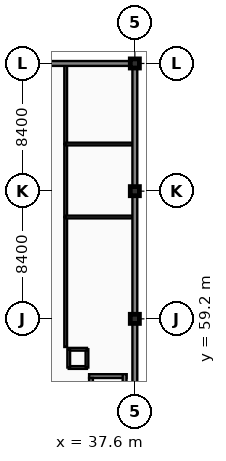
"""IFC4 building model, lengths in metres.
Left out: names, types, materials, properties, quantities, classifications, styles, units other than length and angle.
Written with IfcOpenShell. Run it as: python <this file> out.ifc"""

import sys

from ifc_helpers import new_model, si_unit, direction, frame, frame_2d, origin, origin_2d, place, context, subcontext, project, spatial, rectangle, extrude, element, fill, save


model = new_model("IFC4")
c1 = context("Model", 3, precision=1e-05, world=origin(), true_north=direction((0.0, 1.0)))
c2 = subcontext(c1, "Body", "Model", "MODEL_VIEW")
j1 = project(units=[si_unit("LENGTHUNIT", "METRE"), si_unit("PLANEANGLEUNIT", "RADIAN")], contexts=[c1])
p1 = place(None, origin())
s1 = spatial("IfcSite", under=j1, at=p1, CompositionType="ELEMENT")
p2 = place(p1, origin())
s2 = spatial("IfcBuilding", under=s1, at=p2, CompositionType="ELEMENT")
p3 = place(p2, origin())
s3 = spatial("IfcBuildingStorey", under=s2, at=p3, CompositionType="ELEMENT", Elevation=0.0)
for number, where, z_axis, x_axis in (
    (1, (37.6, 59.2, 0.0), (0.0, 0.0, 1.0), (1.0, 0.0, 0.0)),
    (2, (37.6, 67.6, 0.0), (0.0, 0.0, 1.0), (1.0, 0.0, 0.0)),
    (3, (37.6, 76.0, 0.0), (0.0, 0.0, 1.0), (1.0, 0.0, 0.0)),
):
    element("IfcColumn", number, at=place(p3, frame(where, z_axis=z_axis, x_axis=x_axis)), inside=s3, PredefinedType="COLUMN", context=c2, shape_type="SweptSolid", body=[
        extrude(rectangle(XDim=0.6, YDim=0.6, at=origin_2d()), origin(), (0.0, 0.0, 1.0), 5.4),
    ])
p4 = place(p3, frame((33.05, 57.35, 0.0), z_axis=(0.0, 0.0, 1.0), x_axis=(0.0, 1.0, 0.0)))
e4 = element("IfcWall", 4, at=p4, inside=s3, PredefinedType="PARTITIONING", context=c2, shape_type="SweptSolid", body=[
    extrude(rectangle(XDim=8.55, YDim=0.18, at=frame_2d((4.275, 0.0))), origin(), (0.0, 0.0, 1.0), 4.54),
])
p5 = place(p4, frame((3.775, 0.0, -0.01)))
e5 = element("IfcOpeningElement", 5, at=p5, cuts=e4, PredefinedType="OPENING", context=c2, shape_type="SweptSolid", body=[
    extrude(rectangle(XDim=1.0, YDim=2.16, at=frame_2d((0.5, 1.08))), frame((0.0, 0.1, 0.0), z_axis=(0.0, -1.0, 0.0), x_axis=(1.0, 0.0, 0.0)), (0.0, 0.0, 1.0), 0.2),
])
p6 = place(p3, frame((33.05, 65.9, 0.0), z_axis=(0.0, 0.0, 1.0), x_axis=(0.0, 1.0, 0.0)))
e6 = element("IfcWall", 6, at=p6, inside=s3, PredefinedType="PARTITIONING", context=c2, shape_type="SweptSolid", body=[
    extrude(rectangle(XDim=4.8, YDim=0.18, at=frame_2d((2.4, 0.0))), origin(), (0.0, 0.0, 1.0), 4.54),
])
p7 = place(p6, frame((1.9, 0.0, -0.01)))
e7 = element("IfcOpeningElement", 7, at=p7, cuts=e6, PredefinedType="OPENING", context=c2, shape_type="SweptSolid", body=[
    extrude(rectangle(XDim=1.0, YDim=2.16, at=frame_2d((0.5, 1.08))), frame((0.0, 0.1, 0.0), z_axis=(0.0, -1.0, 0.0), x_axis=(1.0, 0.0, 0.0)), (0.0, 0.0, 1.0), 0.2),
])
p8 = place(p3, frame((33.05, 70.7, 0.0), z_axis=(0.0, 0.0, 1.0), x_axis=(0.0, 1.0, 0.0)))
e8 = element("IfcWall", 8, at=p8, inside=s3, PredefinedType="PARTITIONING", context=c2, shape_type="SweptSolid", body=[
    extrude(rectangle(XDim=5.15, YDim=0.18, at=frame_2d((2.575, 0.0))), origin(), (0.0, 0.0, 1.0), 4.64),
])
p9 = place(p8, frame((2.075, 0.0, -0.01)))
e9 = element("IfcOpeningElement", 9, at=p9, cuts=e8, PredefinedType="OPENING", context=c2, shape_type="SweptSolid", body=[
    extrude(rectangle(XDim=1.0, YDim=2.16, at=frame_2d((0.5, 1.08))), frame((0.0, 0.1, 0.0), z_axis=(0.0, -1.0, 0.0), x_axis=(1.0, 0.0, 0.0)), (0.0, 0.0, 1.0), 0.2),
])
for number, where, z_axis, x_axis in (
    (10, (33.05, 65.9, 0.0), (0.0, 0.0, 1.0), (1.0, 0.0, 0.0)),
    (11, (33.05, 70.7, 0.0), (0.0, 0.0, 1.0), (1.0, 0.0, 0.0)),
):
    element("IfcWall", number, at=place(p3, frame(where, z_axis=z_axis, x_axis=x_axis)), inside=s3, PredefinedType="PARTITIONING", context=c2, shape_type="SweptSolid", body=[
        extrude(rectangle(XDim=4.4, YDim=0.18, at=frame_2d((2.2, 0.0))), origin(), (0.0, 0.0, 1.0), 4.64),
    ])
p10 = place(p3, frame((37.6, 76.0, 0.0), z_axis=(0.0, 0.0, 1.0), x_axis=(-1.0, 0.0, 0.0)))
e12 = element("IfcWall", 12, at=p10, inside=s3, PredefinedType="SOLIDWALL", context=c2, shape_type="SweptSolid", body=[
    extrude(rectangle(XDim=8.4, YDim=0.32, at=frame_2d((4.2, 0.0))), origin(), (0.0, 0.0, 1.0), 4.64),
])
p11 = place(p10, frame((0.46, 0.0, 0.9)))
e13 = element("IfcOpeningElement", 13, at=p11, cuts=e12, PredefinedType="OPENING", context=c2, shape_type="SweptSolid", body=[
    extrude(rectangle(XDim=2.4, YDim=2.35, at=frame_2d((1.2, 1.175))), frame((0.0, 0.17, 0.0), z_axis=(0.0, -1.0, 0.0), x_axis=(1.0, 0.0, 0.0)), (0.0, 0.0, 1.0), 0.34),
])
p12 = place(p10, frame((5.46, 0.0, 0.9)))
e14 = element("IfcOpeningElement", 14, at=p12, cuts=e12, PredefinedType="OPENING", context=c2, shape_type="SweptSolid", body=[
    extrude(rectangle(XDim=2.4, YDim=2.35, at=frame_2d((1.2, 1.175))), frame((0.0, 0.17, 0.0), z_axis=(0.0, -1.0, 0.0), x_axis=(1.0, 0.0, 0.0)), (0.0, 0.0, 1.0), 0.34),
])
p13 = place(p3, frame((37.6, 50.8, 0.0), z_axis=(0.0, 0.0, 1.0), x_axis=(0.0, 1.0, 0.0)))
e15 = element("IfcWall", 15, at=p13, inside=s3, PredefinedType="SOLIDWALL", context=c2, shape_type="SweptSolid", body=[
    extrude(rectangle(XDim=8.4, YDim=0.32, at=frame_2d((4.2, 0.0))), origin(), (0.0, 0.0, 1.0), 4.54),
])
p14 = place(p13, frame((3.2, 0.0, -0.01)))
e16 = element("IfcOpeningElement", 16, at=p14, cuts=e15, PredefinedType="OPENING", context=c2, shape_type="SweptSolid", body=[
    extrude(rectangle(XDim=2.0, YDim=2.41, at=frame_2d((1.0, 1.205))), frame((0.0, 0.17, 0.0), z_axis=(0.0, -1.0, 0.0), x_axis=(1.0, 0.0, 0.0)), (0.0, 0.0, 1.0), 0.34),
])
p15 = place(p3, frame((37.6, 59.2, 0.0), z_axis=(0.0, 0.0, 1.0), x_axis=(0.0, 1.0, 0.0)))
e17 = element("IfcWall", 17, at=p15, inside=s3, PredefinedType="SOLIDWALL", context=c2, shape_type="SweptSolid", body=[
    extrude(rectangle(XDim=8.4, YDim=0.32, at=frame_2d((4.2, 0.0))), origin(), (0.0, 0.0, 1.0), 4.54),
])
p16 = place(p15, frame((0.46, 0.0, 0.9)))
e18 = element("IfcOpeningElement", 18, at=p16, cuts=e17, PredefinedType="OPENING", context=c2, shape_type="SweptSolid", body=[
    extrude(rectangle(XDim=2.4, YDim=2.35, at=frame_2d((1.2, 1.175))), frame((0.0, 0.17, 0.0), z_axis=(0.0, -1.0, 0.0), x_axis=(1.0, 0.0, 0.0)), (0.0, 0.0, 1.0), 0.34),
])
p17 = place(p15, frame((4.06, 0.0, 0.9)))
e19 = element("IfcOpeningElement", 19, at=p17, cuts=e17, PredefinedType="OPENING", context=c2, shape_type="SweptSolid", body=[
    extrude(rectangle(XDim=2.4, YDim=2.35, at=frame_2d((1.2, 1.175))), frame((0.0, 0.17, 0.0), z_axis=(0.0, -1.0, 0.0), x_axis=(1.0, 0.0, 0.0)), (0.0, 0.0, 1.0), 0.34),
])
p18 = place(p3, frame((37.6, 67.6, 0.0), z_axis=(0.0, 0.0, 1.0), x_axis=(0.0, 1.0, 0.0)))
e20 = element("IfcWall", 20, at=p18, inside=s3, PredefinedType="SOLIDWALL", context=c2, shape_type="SweptSolid", body=[
    extrude(rectangle(XDim=8.4, YDim=0.32, at=frame_2d((4.2, 0.0))), origin(), (0.0, 0.0, 1.0), 4.54),
])
p19 = place(p18, frame((0.46, 0.0, 0.9)))
e21 = element("IfcOpeningElement", 21, at=p19, cuts=e20, PredefinedType="OPENING", context=c2, shape_type="SweptSolid", body=[
    extrude(rectangle(XDim=2.4, YDim=2.35, at=frame_2d((1.2, 1.175))), frame((0.0, 0.17, 0.0), z_axis=(0.0, -1.0, 0.0), x_axis=(1.0, 0.0, 0.0)), (0.0, 0.0, 1.0), 0.34),
])
p20 = place(p18, frame((5.46, 0.0, 0.9)))
e22 = element("IfcOpeningElement", 22, at=p20, cuts=e20, PredefinedType="OPENING", context=c2, shape_type="SweptSolid", body=[
    extrude(rectangle(XDim=2.4, YDim=2.35, at=frame_2d((1.2, 1.175))), frame((0.0, 0.17, 0.0), z_axis=(0.0, -1.0, 0.0), x_axis=(1.0, 0.0, 0.0)), (0.0, 0.0, 1.0), 0.34),
])
p21 = place(p3, frame((34.59, 55.435, 0.0), z_axis=(0.0, 0.0, 1.0), x_axis=(1.0, 0.0, 0.0)))
e23 = element("IfcWall", 23, at=p21, inside=s3, PredefinedType="SHEAR", context=c2, shape_type="SweptSolid", body=[
    extrude(rectangle(XDim=2.46, YDim=0.25, at=frame_2d((1.23, 0.0))), origin(), (0.0, 0.0, 1.0), 5.4),
])
p22 = place(p3, frame((34.715, 52.85, 0.0), z_axis=(0.0, 0.0, 1.0), x_axis=(0.0, 1.0, 0.0)))
e24 = element("IfcWall", 24, at=p22, inside=s3, PredefinedType="SHEAR", context=c2, shape_type="SweptSolid", body=[
    extrude(rectangle(XDim=2.46, YDim=0.25, at=frame_2d((1.23, 0.0))), origin(), (0.0, 0.0, 1.0), 5.4),
])
p23 = place(p22, frame((0.68, 0.0, -0.01)))
e25 = element("IfcOpeningElement", 25, at=p23, cuts=e24, PredefinedType="OPENING", context=c2, shape_type="SweptSolid", body=[
    extrude(rectangle(XDim=1.1, YDim=2.16, at=frame_2d((0.55, 1.08))), frame((0.0, 0.135, 0.0), z_axis=(0.0, -1.0, 0.0), x_axis=(1.0, 0.0, 0.0)), (0.0, 0.0, 1.0), 0.27),
])
p24 = place(p3, frame((36.925, 52.85, 0.0), z_axis=(0.0, 0.0, 1.0), x_axis=(0.0, 1.0, 0.0)))
e26 = element("IfcWall", 26, at=p24, inside=s3, PredefinedType="SHEAR", context=c2, shape_type="SweptSolid", body=[
    extrude(rectangle(XDim=2.71, YDim=0.25, at=frame_2d((1.355, 0.0))), origin(), (0.0, 0.0, 1.0), 5.4),
])
for number, where, z_axis, x_axis in (
    (27, (33.25, 56.0, 0.0), (0.0, 0.0, 1.0), (1.0, 0.0, 0.0)),
    (28, (34.45, 56.0, 0.0), (0.0, 0.0, 1.0), (0.0, 1.0, 0.0)),
    (29, (34.45, 57.2, 0.0), (0.0, 0.0, 1.0), (-1.0, 0.0, 0.0)),
):
    element("IfcWall", number, at=place(p3, frame(where, z_axis=z_axis, x_axis=x_axis)), inside=s3, PredefinedType="SOLIDWALL", context=c2, shape_type="SweptSolid", body=[
        extrude(rectangle(XDim=1.2, YDim=0.18, at=frame_2d((0.6, 0.0))), origin(), (0.0, 0.0, 1.0), 5.07),
    ])
p25 = place(p3, frame((33.25, 57.2, 0.0), z_axis=(0.0, 0.0, 1.0), x_axis=(0.0, -1.0, 0.0)))
e30 = element("IfcWall", 30, at=p25, inside=s3, PredefinedType="SOLIDWALL", context=c2, shape_type="SweptSolid", body=[
    extrude(rectangle(XDim=1.2, YDim=0.18, at=frame_2d((0.6, 0.0))), origin(), (0.0, 0.0, 1.0), 5.07),
])
p26 = place(p25, frame((0.2, 0.0, -0.01)))
e31 = element("IfcOpeningElement", 31, at=p26, cuts=e30, PredefinedType="OPENING", context=c2, shape_type="SweptSolid", body=[
    extrude(rectangle(XDim=0.8, YDim=2.06, at=frame_2d((0.4, 1.03))), frame((0.0, 0.1, 0.0), z_axis=(0.0, -1.0, 0.0), x_axis=(1.0, 0.0, 0.0)), (0.0, 0.0, 1.0), 0.2),
])
p27 = place(p5, frame((1.0, 0.0, 0.01), z_axis=(0.0, 0.0, 1.0), x_axis=(-1.0, 0.0, 0.0)))
e32 = element("IfcDoor", 32, at=p27, inside=s3, OperationType="SINGLE_SWING_LEFT", PredefinedType="DOOR", context=c2, shape_type="SweptSolid", body=[
    extrude(rectangle(XDim=1.0, YDim=2.15, at=frame_2d((0.5, 1.075))), frame((0.0, 0.025, 0.0), z_axis=(0.0, -1.0, 0.0), x_axis=(1.0, 0.0, 0.0)), (0.0, 0.0, 1.0), 0.05),
])
fill(e5, e32)
p28 = place(p7, frame((0.0, 0.0, 0.01)))
e33 = element("IfcDoor", 33, at=p28, inside=s3, OperationType="SINGLE_SWING_RIGHT", PredefinedType="DOOR", context=c2, shape_type="SweptSolid", body=[
    extrude(rectangle(XDim=1.0, YDim=2.15, at=frame_2d((0.5, 1.075))), frame((0.0, 0.025, 0.0), z_axis=(0.0, -1.0, 0.0), x_axis=(1.0, 0.0, 0.0)), (0.0, 0.0, 1.0), 0.05),
])
fill(e7, e33)
p29 = place(p9, frame((0.0, 0.0, 0.01)))
e34 = element("IfcDoor", 34, at=p29, inside=s3, OperationType="SINGLE_SWING_LEFT", PredefinedType="DOOR", context=c2, shape_type="SweptSolid", body=[
    extrude(rectangle(XDim=1.0, YDim=2.15, at=frame_2d((0.5, 1.075))), frame((0.0, 0.025, 0.0), z_axis=(0.0, -1.0, 0.0), x_axis=(1.0, 0.0, 0.0)), (0.0, 0.0, 1.0), 0.05),
])
fill(e9, e34)
p30 = place(p11, origin())
e35 = element("IfcWindow", 35, at=p30, inside=s3, PartitioningType="TRIPLE_PANEL_VERTICAL", PredefinedType="WINDOW", context=c2, shape_type="SweptSolid", body=[
    extrude(rectangle(XDim=2.4, YDim=2.35, at=frame_2d((1.2, 1.175))), frame((0.0, 0.03, 0.0), z_axis=(0.0, -1.0, 0.0), x_axis=(1.0, 0.0, 0.0)), (0.0, 0.0, 1.0), 0.06),
])
fill(e13, e35)
p31 = place(p14, frame((0.0, 0.0, 0.01)))
e36 = element("IfcDoor", 36, at=p31, inside=s3, OperationType="DOUBLE_SWING_LEFT", PredefinedType="DOOR", context=c2, shape_type="SweptSolid", body=[
    extrude(rectangle(XDim=2.0, YDim=2.4, at=frame_2d((1.0, 1.2))), frame((0.0, 0.025, 0.0), z_axis=(0.0, -1.0, 0.0), x_axis=(1.0, 0.0, 0.0)), (0.0, 0.0, 1.0), 0.05),
])
fill(e16, e36)
p32 = place(p16, origin())
e37 = element("IfcWindow", 37, at=p32, inside=s3, PartitioningType="TRIPLE_PANEL_VERTICAL", PredefinedType="WINDOW", context=c2, shape_type="SweptSolid", body=[
    extrude(rectangle(XDim=2.4, YDim=2.35, at=frame_2d((1.2, 1.175))), frame((0.0, 0.03, 0.0), z_axis=(0.0, -1.0, 0.0), x_axis=(1.0, 0.0, 0.0)), (0.0, 0.0, 1.0), 0.06),
])
fill(e18, e37)
p33 = place(p17, origin())
e38 = element("IfcWindow", 38, at=p33, inside=s3, PartitioningType="TRIPLE_PANEL_VERTICAL", PredefinedType="WINDOW", context=c2, shape_type="SweptSolid", body=[
    extrude(rectangle(XDim=2.4, YDim=2.35, at=frame_2d((1.2, 1.175))), frame((0.0, 0.03, 0.0), z_axis=(0.0, -1.0, 0.0), x_axis=(1.0, 0.0, 0.0)), (0.0, 0.0, 1.0), 0.06),
])
fill(e19, e38)
p34 = place(p19, origin())
e39 = element("IfcWindow", 39, at=p34, inside=s3, PartitioningType="TRIPLE_PANEL_VERTICAL", PredefinedType="WINDOW", context=c2, shape_type="SweptSolid", body=[
    extrude(rectangle(XDim=2.4, YDim=2.35, at=frame_2d((1.2, 1.175))), frame((0.0, 0.03, 0.0), z_axis=(0.0, -1.0, 0.0), x_axis=(1.0, 0.0, 0.0)), (0.0, 0.0, 1.0), 0.06),
])
fill(e21, e39)
p35 = place(p20, origin())
e40 = element("IfcWindow", 40, at=p35, inside=s3, PartitioningType="TRIPLE_PANEL_VERTICAL", PredefinedType="WINDOW", context=c2, shape_type="SweptSolid", body=[
    extrude(rectangle(XDim=2.4, YDim=2.35, at=frame_2d((1.2, 1.175))), frame((0.0, 0.03, 0.0), z_axis=(0.0, -1.0, 0.0), x_axis=(1.0, 0.0, 0.0)), (0.0, 0.0, 1.0), 0.06),
])
fill(e22, e40)
p36 = place(p26, frame((0.0, 0.0, 0.01)))
e41 = element("IfcDoor", 41, at=p36, inside=s3, OperationType="SINGLE_SWING_LEFT", PredefinedType="DOOR", context=c2, shape_type="SweptSolid", body=[
    extrude(rectangle(XDim=0.8, YDim=2.05, at=frame_2d((0.4, 1.025))), frame((0.0, 0.025, 0.0), z_axis=(0.0, -1.0, 0.0), x_axis=(1.0, 0.0, 0.0)), (0.0, 0.0, 1.0), 0.05),
])
fill(e31, e41)
save(model, sys.argv[1])
